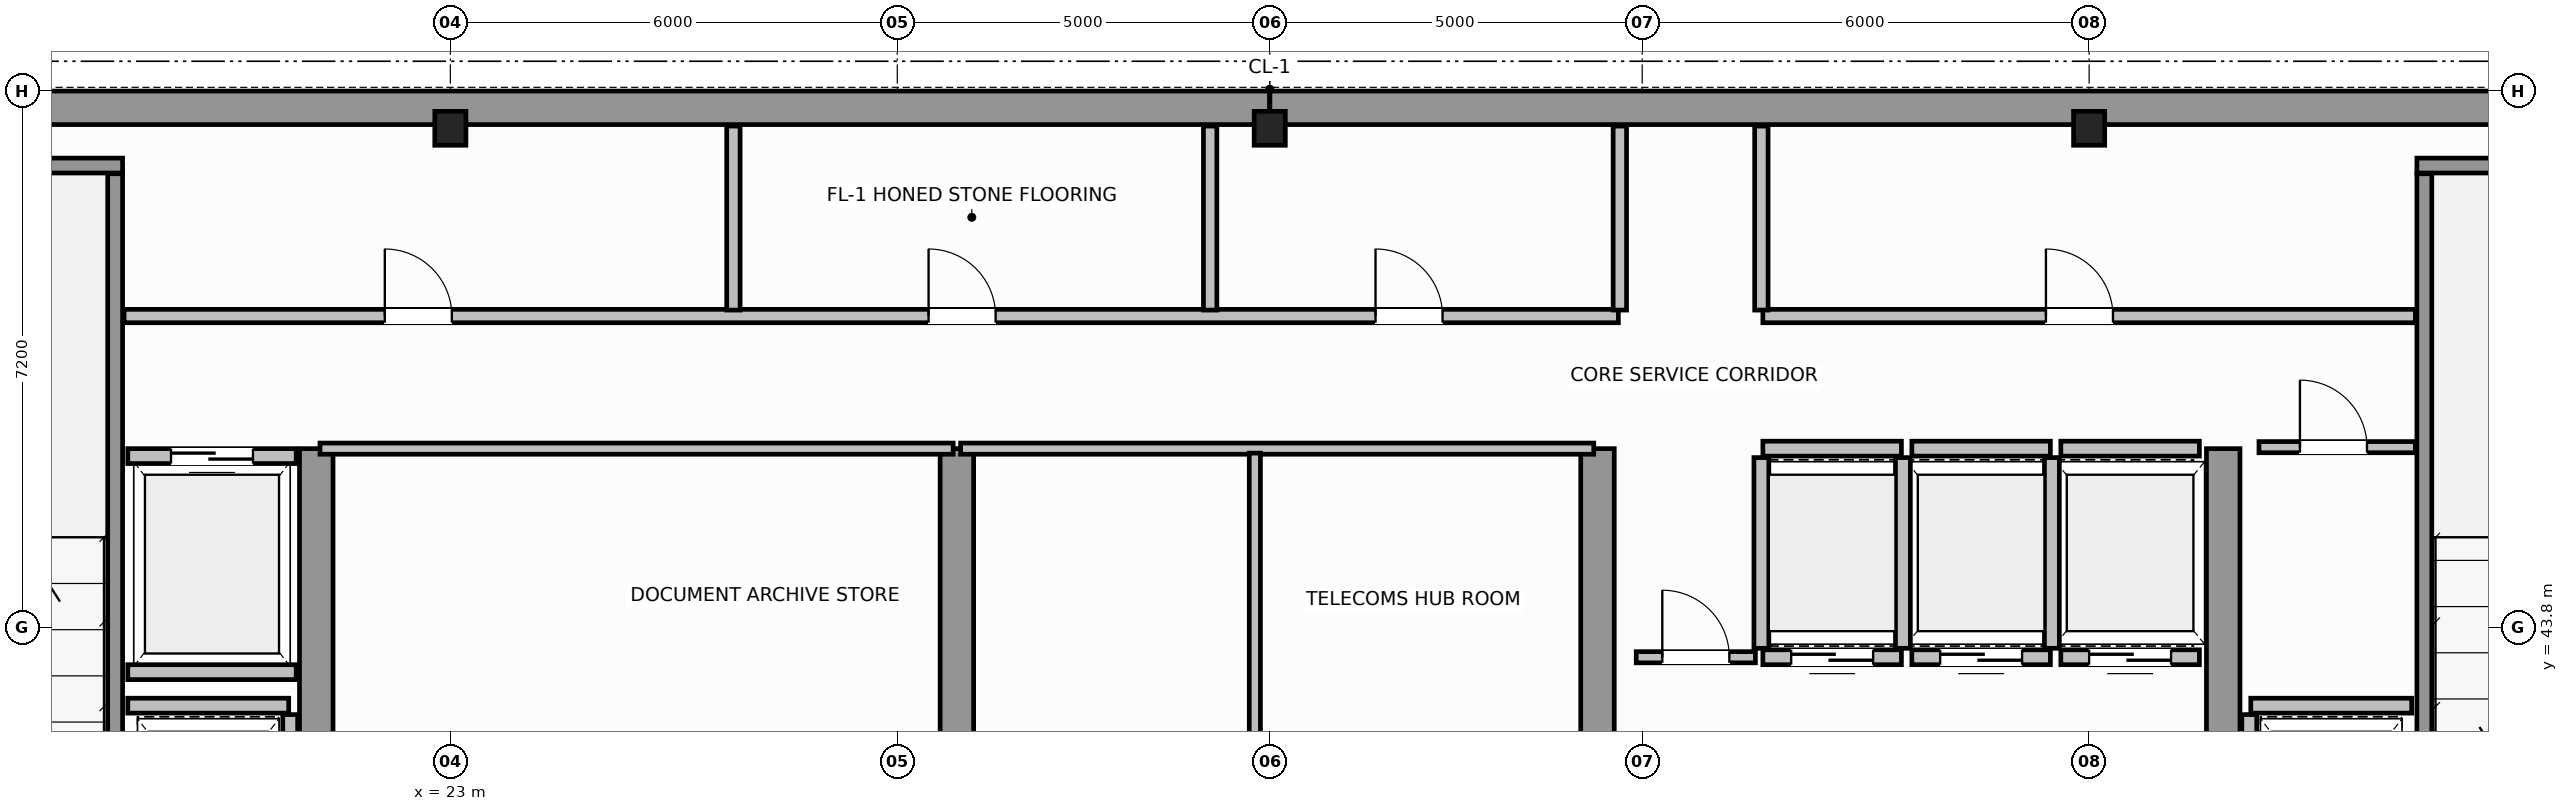
"""IFC4 building model, lengths in metres.
Left out: names, types, materials, properties, quantities, classifications, styles, units other than length and angle.
Written with IfcOpenShell. Run it as: python <this file> out.ifc"""

import sys

from ifc_helpers import new_model, si_unit, direction, frame, frame_2d, origin, origin_2d, place, context, subcontext, project, spatial, rectangle, i_section, extrude, source, transform, mapped, element, fill, save


model = new_model("IFC4")
c1 = context("Model", 3, precision=1e-05, world=origin(), true_north=direction((0.0, 1.0)))
c2 = subcontext(c1, "Body", "Model", "MODEL_VIEW")
j1 = project(units=[si_unit("LENGTHUNIT", "METRE"), si_unit("PLANEANGLEUNIT", "RADIAN")], contexts=[c1])
p1 = place(None, origin())
s1 = spatial("IfcSite", under=j1, at=p1, CompositionType="ELEMENT")
p2 = place(p1, origin())
s2 = spatial("IfcBuilding", under=s1, at=p2, CompositionType="ELEMENT")
p3 = place(p2, frame((0.0, 0.0, 257.4)))
s3 = spatial("IfcBuildingStorey", under=s2, at=p3, CompositionType="ELEMENT", Elevation=257.4)
m1 = source(origin(), c2, "Body", "SweptSolid", [
    extrude(i_section(OverallWidth=0.418, OverallDepth=0.455, WebThickness=0.042, FlangeThickness=0.058, FilletRadius=0.015, at=origin_2d()), origin(), (0.0, 0.0, 1.0), 3.8),
])
for number, where, z_axis, x_axis in (
    (1, (23.0, 50.5, 0.0), (0.0, 0.0, 1.0), (1.0, 0.0, 0.0)),
    (2, (34.0, 50.5, 0.0), (0.0, 0.0, 1.0), (1.0, 0.0, 0.0)),
    (3, (45.0, 50.5, 0.0), (0.0, 0.0, 1.0), (1.0, 0.0, 0.0)),
):
    element("IfcColumn", number, at=place(p3, frame(where, z_axis=z_axis, x_axis=x_axis)), inside=s3, PredefinedType="COLUMN", context=c2, shape_type="MappedRepresentation", body=[
        mapped(m1, transform((0.0, 0.0, 0.0), scale=1.0)),
    ])
for number, where, z_axis, x_axis in (
    (4, (14.229, 50.775, 0.0), (0.0, 0.0, 1.0), (1.0, 0.0, 0.0)),
    (5, (34.002, 50.775, 0.0), (0.0, 0.0, 1.0), (1.0, 0.0, 0.0)),
):
    element("IfcWall", number, at=place(p3, frame(where, z_axis=z_axis, x_axis=x_axis)), inside=s3, PredefinedType="SHEAR", context=c2, shape_type="SweptSolid", body=[
        extrude(rectangle(XDim=19.769, YDim=0.45, at=frame_2d((9.885, 0.0))), origin(), (0.0, 0.0, 1.0), 3.8),
    ])
for number, where, z_axis, x_axis in (
    (6, (21.2, 36.745, 0.0), (0.0, 0.0, 1.0), (0.0, 1.0, 0.0)),
    (7, (29.8, 36.745, 0.0), (0.0, 0.0, 1.0), (0.0, 1.0, 0.0)),
    (8, (38.4, 36.745, 0.0), (0.0, 0.0, 1.0), (0.0, 1.0, 0.0)),
    (9, (46.8, 36.745, 0.0), (0.0, 0.0, 1.0), (0.0, 1.0, 0.0)),
):
    element("IfcWall", number, at=place(p3, frame(where, z_axis=z_axis, x_axis=x_axis)), inside=s3, PredefinedType="SHEAR", context=c2, shape_type="SweptSolid", body=[
        extrude(rectangle(XDim=9.455, YDim=0.45, at=frame_2d((4.728, 0.0))), origin(), (0.0, 0.0, 1.0), 3.8),
    ])
p4 = place(p3, frame((14.225, 50.0, 0.0), z_axis=(0.0, 0.0, 1.0), x_axis=(1.0, 0.0, 0.0)))
e10 = element("IfcWall", 10, at=p4, inside=s3, PredefinedType="SOLIDWALL", context=c2, shape_type="SweptSolid", body=[
    extrude(rectangle(XDim=4.375, YDim=0.2, at=frame_2d((2.188, 0.0))), origin(), (0.0, 0.0, 1.0), 3.8),
])
p5 = place(p3, frame((18.5, 39.96, 0.0), z_axis=(0.0, 0.0, 1.0), x_axis=(0.0, 1.0, 0.0)))
e11 = element("IfcWall", 11, at=p5, inside=s3, PredefinedType="SOLIDWALL", context=c2, shape_type="SweptSolid", body=[
    extrude(rectangle(XDim=9.93, YDim=0.2, at=frame_2d((4.965, 0.0))), origin(), (0.0, 0.0, 1.0), 3.8),
])
p6 = place(p3, frame((49.4, 50.0, 0.0), z_axis=(0.0, 0.0, 1.0), x_axis=(1.0, 0.0, 0.0)))
e12 = element("IfcWall", 12, at=p6, inside=s3, PredefinedType="SOLIDWALL", context=c2, shape_type="SweptSolid", body=[
    extrude(rectangle(XDim=4.375, YDim=0.2, at=frame_2d((2.188, 0.0))), origin(), (0.0, 0.0, 1.0), 3.8),
])
p7 = place(p3, frame((49.5, 39.96, 0.0), z_axis=(0.0, 0.0, 1.0), x_axis=(0.0, 1.0, 0.0)))
e13 = element("IfcWall", 13, at=p7, inside=s3, PredefinedType="SOLIDWALL", context=c2, shape_type="SweptSolid", body=[
    extrude(rectangle(XDim=9.93, YDim=0.2, at=frame_2d((4.965, 0.0))), origin(), (0.0, 0.0, 1.0), 3.8),
])
p8 = place(p3, frame((40.62, 43.4, 0.0), z_axis=(0.0, 0.0, 1.0), x_axis=(1.0, 0.0, 0.0)))
e14 = element("IfcWall", 14, at=p8, inside=s3, PredefinedType="SOLIDWALL", context=c2, shape_type="SweptSolid", body=[
    extrude(rectangle(XDim=1.86, YDim=0.2, at=frame_2d((0.93, 0.0))), origin(), (0.0, 0.0, 1.0), 3.58),
])
p9 = place(p8, frame((0.38, 0.0, 0.0)))
e15 = element("IfcOpeningElement", 15, at=p9, cuts=e14, PredefinedType="OPENING", context=c2, shape_type="SweptSolid", body=[
    extrude(rectangle(XDim=1.1, YDim=2.15, at=frame_2d((0.55, 1.075))), frame((0.0, 0.11, 0.0), z_axis=(0.0, -1.0, 0.0), x_axis=(1.0, 0.0, 0.0)), (0.0, 0.0, 1.0), 0.22),
])
p10 = place(p3, frame((40.62, 46.2, 0.0), z_axis=(0.0, 0.0, 1.0), x_axis=(1.0, 0.0, 0.0)))
e16 = element("IfcWall", 16, at=p10, inside=s3, PredefinedType="SOLIDWALL", context=c2, shape_type="SweptSolid", body=[
    extrude(rectangle(XDim=1.86, YDim=0.2, at=frame_2d((0.93, 0.0))), origin(), (0.0, 0.0, 1.0), 3.58),
])
for number, where, z_axis, x_axis in (
    (17, (40.6, 43.52, 0.0), (0.0, 0.0, 1.0), (0.0, 1.0, 0.0)),
    (18, (42.5, 43.52, 0.0), (0.0, 0.0, 1.0), (0.0, 1.0, 0.0)),
):
    element("IfcWall", number, at=place(p3, frame(where, z_axis=z_axis, x_axis=x_axis)), inside=s3, PredefinedType="SOLIDWALL", context=c2, shape_type="SweptSolid", body=[
        extrude(rectangle(XDim=2.56, YDim=0.2, at=frame_2d((1.28, 0.0))), origin(), (0.0, 0.0, 1.0), 3.58),
    ])
p11 = place(p3, frame((42.62, 43.4, 0.0), z_axis=(0.0, 0.0, 1.0), x_axis=(1.0, 0.0, 0.0)))
e19 = element("IfcWall", 19, at=p11, inside=s3, PredefinedType="SOLIDWALL", context=c2, shape_type="SweptSolid", body=[
    extrude(rectangle(XDim=1.86, YDim=0.2, at=frame_2d((0.93, 0.0))), origin(), (0.0, 0.0, 1.0), 3.58),
])
p12 = place(p11, frame((0.38, 0.0, 0.0)))
e20 = element("IfcOpeningElement", 20, at=p12, cuts=e19, PredefinedType="OPENING", context=c2, shape_type="SweptSolid", body=[
    extrude(rectangle(XDim=1.1, YDim=2.15, at=frame_2d((0.55, 1.075))), frame((0.0, 0.11, 0.0), z_axis=(0.0, -1.0, 0.0), x_axis=(1.0, 0.0, 0.0)), (0.0, 0.0, 1.0), 0.22),
])
p13 = place(p3, frame((42.62, 46.2, 0.0), z_axis=(0.0, 0.0, 1.0), x_axis=(1.0, 0.0, 0.0)))
e21 = element("IfcWall", 21, at=p13, inside=s3, PredefinedType="SOLIDWALL", context=c2, shape_type="SweptSolid", body=[
    extrude(rectangle(XDim=1.86, YDim=0.2, at=frame_2d((0.93, 0.0))), origin(), (0.0, 0.0, 1.0), 3.58),
])
p14 = place(p3, frame((44.5, 43.52, 0.0), z_axis=(0.0, 0.0, 1.0), x_axis=(0.0, 1.0, 0.0)))
e22 = element("IfcWall", 22, at=p14, inside=s3, PredefinedType="SOLIDWALL", context=c2, shape_type="SweptSolid", body=[
    extrude(rectangle(XDim=2.56, YDim=0.2, at=frame_2d((1.28, 0.0))), origin(), (0.0, 0.0, 1.0), 3.58),
])
p15 = place(p3, frame((44.62, 43.4, 0.0), z_axis=(0.0, 0.0, 1.0), x_axis=(1.0, 0.0, 0.0)))
e23 = element("IfcWall", 23, at=p15, inside=s3, PredefinedType="SOLIDWALL", context=c2, shape_type="SweptSolid", body=[
    extrude(rectangle(XDim=1.86, YDim=0.2, at=frame_2d((0.93, 0.0))), origin(), (0.0, 0.0, 1.0), 3.58),
])
p16 = place(p15, frame((0.38, 0.0, 0.0)))
e24 = element("IfcOpeningElement", 24, at=p16, cuts=e23, PredefinedType="OPENING", context=c2, shape_type="SweptSolid", body=[
    extrude(rectangle(XDim=1.1, YDim=2.15, at=frame_2d((0.55, 1.075))), frame((0.0, 0.11, 0.0), z_axis=(0.0, -1.0, 0.0), x_axis=(1.0, 0.0, 0.0)), (0.0, 0.0, 1.0), 0.22),
])
p17 = place(p3, frame((44.62, 46.2, 0.0), z_axis=(0.0, 0.0, 1.0), x_axis=(1.0, 0.0, 0.0)))
e25 = element("IfcWall", 25, at=p17, inside=s3, PredefinedType="SOLIDWALL", context=c2, shape_type="SweptSolid", body=[
    extrude(rectangle(XDim=1.86, YDim=0.2, at=frame_2d((0.93, 0.0))), origin(), (0.0, 0.0, 1.0), 3.58),
])
p18 = place(p3, frame((18.67, 46.1, 0.0), z_axis=(0.0, 0.0, 1.0), x_axis=(1.0, 0.0, 0.0)))
e26 = element("IfcWall", 26, at=p18, inside=s3, PredefinedType="SOLIDWALL", context=c2, shape_type="SweptSolid", body=[
    extrude(rectangle(XDim=2.26, YDim=0.2, at=frame_2d((1.13, 0.0))), origin(), (0.0, 0.0, 1.0), 3.58),
])
p19 = place(p18, frame((0.58, 0.0, 0.0)))
e27 = element("IfcOpeningElement", 27, at=p19, cuts=e26, PredefinedType="OPENING", context=c2, shape_type="SweptSolid", body=[
    extrude(rectangle(XDim=1.1, YDim=2.15, at=frame_2d((0.55, 1.075))), frame((0.0, 0.11, 0.0), z_axis=(0.0, -1.0, 0.0), x_axis=(1.0, 0.0, 0.0)), (0.0, 0.0, 1.0), 0.22),
])
p20 = place(p3, frame((18.67, 43.2, 0.0), z_axis=(0.0, 0.0, 1.0), x_axis=(1.0, 0.0, 0.0)))
e28 = element("IfcWall", 28, at=p20, inside=s3, PredefinedType="SOLIDWALL", context=c2, shape_type="SweptSolid", body=[
    extrude(rectangle(XDim=2.26, YDim=0.2, at=frame_2d((1.13, 0.0))), origin(), (0.0, 0.0, 1.0), 3.58),
])
p21 = place(p3, frame((18.67, 42.75, 0.0), z_axis=(0.0, 0.0, 1.0), x_axis=(1.0, 0.0, 0.0)))
e29 = element("IfcWall", 29, at=p21, inside=s3, PredefinedType="SOLIDWALL", context=c2, shape_type="SweptSolid", body=[
    extrude(rectangle(XDim=2.16, YDim=0.2, at=frame_2d((1.08, 0.0))), origin(), (0.0, 0.0, 1.0), 3.58),
])
p22 = place(p3, frame((20.85, 40.07, 0.0), z_axis=(0.0, 0.0, 1.0), x_axis=(0.0, 1.0, 0.0)))
e30 = element("IfcWall", 30, at=p22, inside=s3, PredefinedType="SOLIDWALL", context=c2, shape_type="SweptSolid", body=[
    extrude(rectangle(XDim=2.56, YDim=0.2, at=frame_2d((1.28, 0.0))), origin(), (0.0, 0.0, 1.0), 3.58),
])
p23 = place(p3, frame((47.17, 42.75, 0.0), z_axis=(0.0, 0.0, 1.0), x_axis=(1.0, 0.0, 0.0)))
e31 = element("IfcWall", 31, at=p23, inside=s3, PredefinedType="SOLIDWALL", context=c2, shape_type="SweptSolid", body=[
    extrude(rectangle(XDim=2.16, YDim=0.2, at=frame_2d((1.08, 0.0))), origin(), (0.0, 0.0, 1.0), 3.58),
])
p24 = place(p3, frame((47.15, 40.07, 0.0), z_axis=(0.0, 0.0, 1.0), x_axis=(0.0, 1.0, 0.0)))
e32 = element("IfcWall", 32, at=p24, inside=s3, PredefinedType="SOLIDWALL", context=c2, shape_type="SweptSolid", body=[
    extrude(rectangle(XDim=2.56, YDim=0.2, at=frame_2d((1.28, 0.0))), origin(), (0.0, 0.0, 1.0), 3.58),
])
for number, where, z_axis, x_axis in (
    (33, (21.25, 46.2, 0.0), (0.0, 0.0, 1.0), (1.0, 0.0, 0.0)),
    (34, (29.85, 46.2, 0.0), (0.0, 0.0, 1.0), (1.0, 0.0, 0.0)),
):
    element("IfcWall", number, at=place(p3, frame(where, z_axis=z_axis, x_axis=x_axis)), inside=s3, PredefinedType="PARTITIONING", context=c2, shape_type="SweptSolid", body=[
        extrude(rectangle(XDim=8.5, YDim=0.15, at=frame_2d((4.25, 0.0))), origin(), (0.0, 0.0, 1.0), 3.58),
    ])
p25 = place(p3, frame((33.8, 36.56, 0.0), z_axis=(0.0, 0.0, 1.0), x_axis=(0.0, 1.0, 0.0)))
e35 = element("IfcWall", 35, at=p25, inside=s3, PredefinedType="PARTITIONING", context=c2, shape_type="SweptSolid", body=[
    extrude(rectangle(XDim=9.58, YDim=0.15, at=frame_2d((4.79, 0.0))), origin(), (0.0, 0.0, 1.0), 3.58),
])
p26 = place(p25, frame((4.2, 0.0, 0.0)))
e36 = element("IfcOpeningElement", 36, at=p26, cuts=e35, PredefinedType="OPENING", context=c2, shape_type="SweptSolid", body=[
    extrude(rectangle(XDim=0.9, YDim=2.1, at=frame_2d((0.45, 1.05))), frame((0.0, 0.085, 0.0), z_axis=(0.0, -1.0, 0.0), x_axis=(1.0, 0.0, 0.0)), (0.0, 0.0, 1.0), 0.17),
])
p27 = place(p3, frame((47.28, 46.22, 0.0), z_axis=(0.0, 0.0, 1.0), x_axis=(1.0, 0.0, 0.0)))
e37 = element("IfcWall", 37, at=p27, inside=s3, PredefinedType="PARTITIONING", context=c2, shape_type="SweptSolid", body=[
    extrude(rectangle(XDim=2.1, YDim=0.15, at=frame_2d((1.05, 0.0))), origin(), (0.0, 0.0, 1.0), 3.58),
])
p28 = place(p27, frame((0.55, 0.0, 0.0)))
e38 = element("IfcOpeningElement", 38, at=p28, cuts=e37, PredefinedType="OPENING", context=c2, shape_type="SweptSolid", body=[
    extrude(rectangle(XDim=0.9, YDim=2.1, at=frame_2d((0.45, 1.05))), frame((0.0, 0.085, 0.0), z_axis=(0.0, -1.0, 0.0), x_axis=(1.0, 0.0, 0.0)), (0.0, 0.0, 1.0), 0.17),
])
p29 = place(p3, frame((38.92, 43.4, 0.0), z_axis=(0.0, 0.0, 1.0), x_axis=(1.0, 0.0, 0.0)))
e39 = element("IfcWall", 39, at=p29, inside=s3, PredefinedType="PARTITIONING", context=c2, shape_type="SweptSolid", body=[
    extrude(rectangle(XDim=1.6, YDim=0.15, at=frame_2d((0.8, 0.0))), origin(), (0.0, 0.0, 1.0), 3.58),
])
p30 = place(p29, frame((0.35, 0.0, 0.0)))
e40 = element("IfcOpeningElement", 40, at=p30, cuts=e39, PredefinedType="OPENING", context=c2, shape_type="SweptSolid", body=[
    extrude(rectangle(XDim=0.9, YDim=2.1, at=frame_2d((0.45, 1.05))), frame((0.0, 0.085, 0.0), z_axis=(0.0, -1.0, 0.0), x_axis=(1.0, 0.0, 0.0)), (0.0, 0.0, 1.0), 0.17),
])
p31 = place(p3, frame((18.62, 47.98, 0.0), z_axis=(0.0, 0.0, 1.0), x_axis=(1.0, 0.0, 0.0)))
e41 = element("IfcWall", 41, at=p31, inside=s3, PredefinedType="PLUMBINGWALL", context=c2, shape_type="SweptSolid", body=[
    extrude(rectangle(XDim=20.06, YDim=0.18, at=frame_2d((10.03, 0.0))), origin(), (0.0, 0.0, 1.0), 3.58),
])
p32 = place(p31, frame((3.5, 0.0, 0.0)))
e42 = element("IfcOpeningElement", 42, at=p32, cuts=e41, PredefinedType="OPENING", context=c2, shape_type="SweptSolid", body=[
    extrude(rectangle(XDim=0.9, YDim=2.15, at=frame_2d((0.45, 1.075))), frame((0.0, 0.1, 0.0), z_axis=(0.0, -1.0, 0.0), x_axis=(1.0, 0.0, 0.0)), (0.0, 0.0, 1.0), 0.2),
])
p33 = place(p31, frame((10.8, 0.0, 0.0)))
e43 = element("IfcOpeningElement", 43, at=p33, cuts=e41, PredefinedType="OPENING", context=c2, shape_type="SweptSolid", body=[
    extrude(rectangle(XDim=0.9, YDim=2.15, at=frame_2d((0.45, 1.075))), frame((0.0, 0.1, 0.0), z_axis=(0.0, -1.0, 0.0), x_axis=(1.0, 0.0, 0.0)), (0.0, 0.0, 1.0), 0.2),
])
p34 = place(p31, frame((16.8, 0.0, 0.0)))
e44 = element("IfcOpeningElement", 44, at=p34, cuts=e41, PredefinedType="OPENING", context=c2, shape_type="SweptSolid", body=[
    extrude(rectangle(XDim=0.9, YDim=2.15, at=frame_2d((0.45, 1.075))), frame((0.0, 0.1, 0.0), z_axis=(0.0, -1.0, 0.0), x_axis=(1.0, 0.0, 0.0)), (0.0, 0.0, 1.0), 0.2),
])
p35 = place(p3, frame((40.62, 47.98, 0.0), z_axis=(0.0, 0.0, 1.0), x_axis=(1.0, 0.0, 0.0)))
e45 = element("IfcWall", 45, at=p35, inside=s3, PredefinedType="PLUMBINGWALL", context=c2, shape_type="SweptSolid", body=[
    extrude(rectangle(XDim=8.76, YDim=0.18, at=frame_2d((4.38, 0.0))), origin(), (0.0, 0.0, 1.0), 3.58),
])
p36 = place(p35, frame((3.8, 0.0, 0.0)))
e46 = element("IfcOpeningElement", 46, at=p36, cuts=e45, PredefinedType="OPENING", context=c2, shape_type="SweptSolid", body=[
    extrude(rectangle(XDim=0.9, YDim=2.15, at=frame_2d((0.45, 1.075))), frame((0.0, 0.1, 0.0), z_axis=(0.0, -1.0, 0.0), x_axis=(1.0, 0.0, 0.0)), (0.0, 0.0, 1.0), 0.2),
])
for number, where, z_axis, x_axis in (
    (47, (26.8, 48.06, 0.0), (0.0, 0.0, 1.0), (0.0, 1.0, 0.0)),
    (48, (33.2, 48.06, 0.0), (0.0, 0.0, 1.0), (0.0, 1.0, 0.0)),
    (49, (38.7, 48.06, 0.0), (0.0, 0.0, 1.0), (0.0, 1.0, 0.0)),
    (50, (40.6, 48.06, 0.0), (0.0, 0.0, 1.0), (0.0, 1.0, 0.0)),
):
    element("IfcWall", number, at=place(p3, frame(where, z_axis=z_axis, x_axis=x_axis)), inside=s3, PredefinedType="PLUMBINGWALL", context=c2, shape_type="SweptSolid", body=[
        extrude(rectangle(XDim=2.47, YDim=0.18, at=frame_2d((1.235, 0.0))), origin(), (0.0, 0.0, 1.0), 3.58),
    ])
m2 = source(origin(), c2, "Body", "SweptSolid", [
    extrude(rectangle(XDim=1.1, YDim=2.15, at=frame_2d((0.55, 1.075))), frame((0.0, 0.025, 0.0), z_axis=(0.0, -1.0, 0.0), x_axis=(1.0, 0.0, 0.0)), (0.0, 0.0, 1.0), 0.05),
])
p37 = place(p9, origin())
e51 = element("IfcDoor", 51, at=p37, inside=s3, OperationType="DOUBLE_DOOR_SLIDING", PredefinedType="DOOR", context=c2, shape_type="MappedRepresentation", body=[
    mapped(m2, transform((0.0, 0.0, 0.0), scale=1.0)),
])
fill(e15, e51)
p38 = place(p12, origin())
e52 = element("IfcDoor", 52, at=p38, inside=s3, OperationType="DOUBLE_DOOR_SLIDING", PredefinedType="DOOR", context=c2, shape_type="MappedRepresentation", body=[
    mapped(m2, transform((0.0, 0.0, 0.0), scale=1.0)),
])
fill(e20, e52)
p39 = place(p16, origin())
e53 = element("IfcDoor", 53, at=p39, inside=s3, OperationType="DOUBLE_DOOR_SLIDING", PredefinedType="DOOR", context=c2, shape_type="MappedRepresentation", body=[
    mapped(m2, transform((0.0, 0.0, 0.0), scale=1.0)),
])
fill(e24, e53)
p40 = place(p19, origin())
e54 = element("IfcDoor", 54, at=p40, inside=s3, OperationType="DOUBLE_DOOR_SLIDING", PredefinedType="DOOR", context=c2, shape_type="MappedRepresentation", body=[
    mapped(m2, transform((0.0, 0.0, 0.0), scale=1.0)),
])
fill(e27, e54)
m3 = source(origin(), c2, "Body", "SweptSolid", [
    extrude(rectangle(XDim=0.9, YDim=2.1, at=frame_2d((0.45, 1.05))), frame((0.0, 0.025, 0.0), z_axis=(0.0, -1.0, 0.0), x_axis=(1.0, 0.0, 0.0)), (0.0, 0.0, 1.0), 0.05),
])
p41 = place(p28, origin())
e55 = element("IfcDoor", 55, at=p41, inside=s3, OperationType="SINGLE_SWING_RIGHT", PredefinedType="DOOR", context=c2, shape_type="MappedRepresentation", body=[
    mapped(m3, transform((0.0, 0.0, 0.0), scale=1.0)),
])
fill(e38, e55)
p42 = place(p30, origin())
e56 = element("IfcDoor", 56, at=p42, inside=s3, OperationType="SINGLE_SWING_LEFT", PredefinedType="DOOR", context=c2, shape_type="MappedRepresentation", body=[
    mapped(m3, transform((0.0, 0.0, 0.0), scale=1.0)),
])
fill(e40, e56)
m4 = source(origin(), c2, "Body", "SweptSolid", [
    extrude(rectangle(XDim=0.9, YDim=2.15, at=frame_2d((0.45, 1.075))), frame((0.0, 0.025, 0.0), z_axis=(0.0, -1.0, 0.0), x_axis=(1.0, 0.0, 0.0)), (0.0, 0.0, 1.0), 0.05),
])
p43 = place(p32, origin())
e57 = element("IfcDoor", 57, at=p43, inside=s3, OperationType="SINGLE_SWING_LEFT", PredefinedType="DOOR", context=c2, shape_type="MappedRepresentation", body=[
    mapped(m4, transform((0.0, 0.0, 0.0), scale=1.0)),
])
fill(e42, e57)
p44 = place(p33, origin())
e58 = element("IfcDoor", 58, at=p44, inside=s3, OperationType="SINGLE_SWING_RIGHT", PredefinedType="DOOR", context=c2, shape_type="MappedRepresentation", body=[
    mapped(m4, transform((0.0, 0.0, 0.0), scale=1.0)),
])
fill(e43, e58)
p45 = place(p34, origin())
e59 = element("IfcDoor", 59, at=p45, inside=s3, OperationType="SINGLE_SWING_LEFT", PredefinedType="DOOR", context=c2, shape_type="MappedRepresentation", body=[
    mapped(m4, transform((0.0, 0.0, 0.0), scale=1.0)),
])
fill(e44, e59)
p46 = place(p36, origin())
e60 = element("IfcDoor", 60, at=p46, inside=s3, OperationType="SINGLE_SWING_RIGHT", PredefinedType="DOOR", context=c2, shape_type="MappedRepresentation", body=[
    mapped(m4, transform((0.0, 0.0, 0.0), scale=1.0)),
])
fill(e46, e60)
save(model, sys.argv[1])
